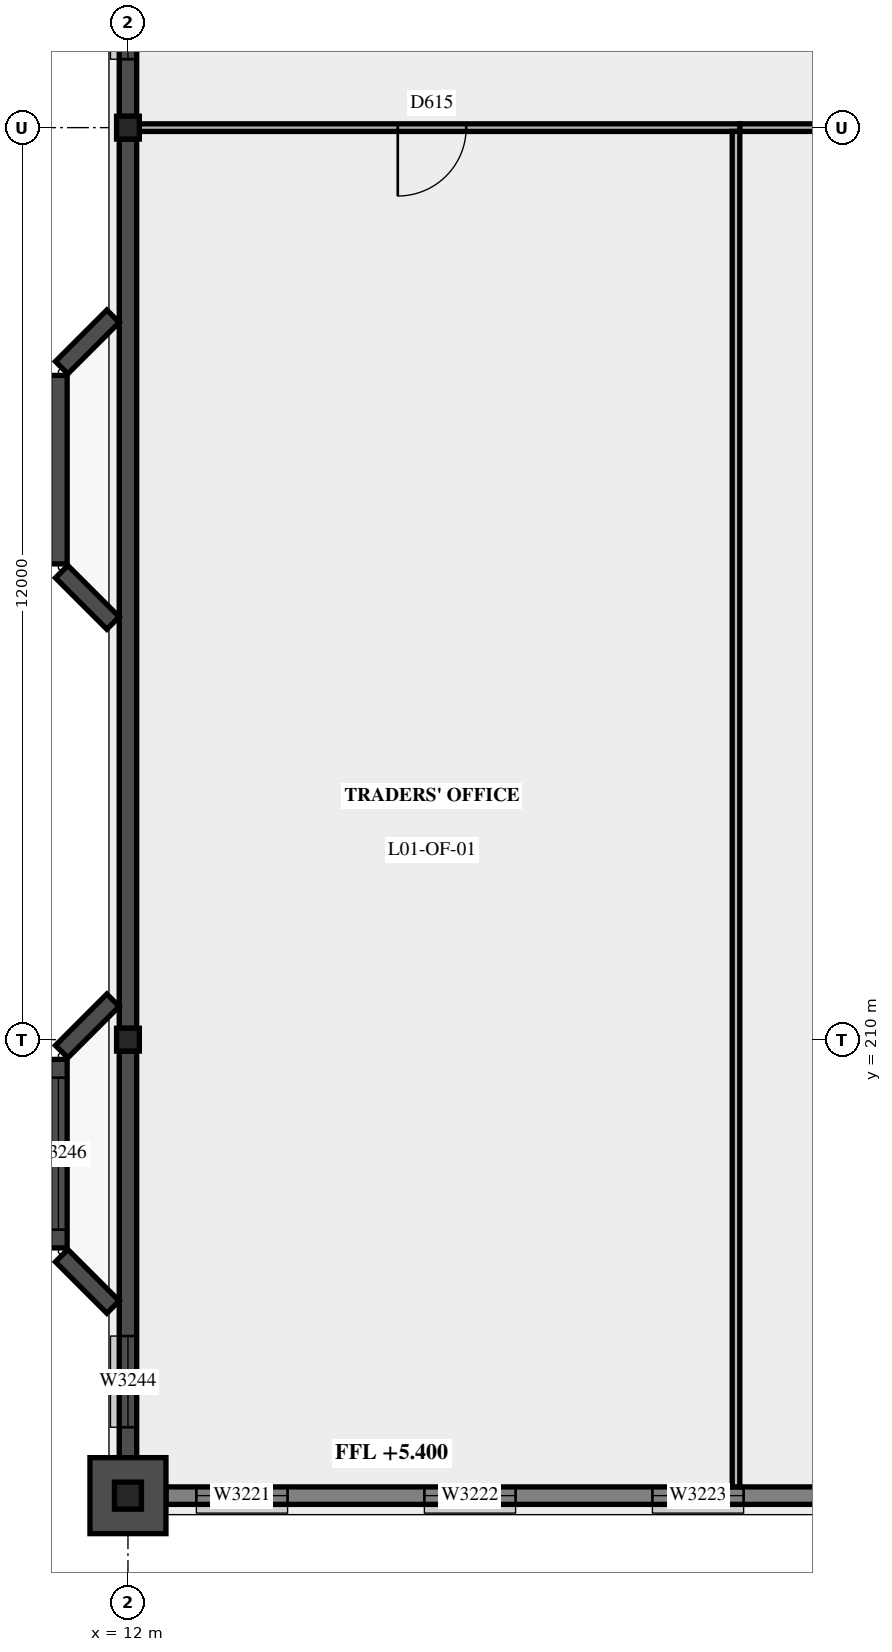
"""IFC4 building model, lengths in metres.
Left out: names, types, materials, properties, quantities, classifications, styles, units other than length and angle.
Written with IfcOpenShell. Run it as: python <this file> out.ifc"""

import sys

from ifc_helpers import new_model, si_unit, direction, frame, frame_2d, origin, origin_2d, place, context, subcontext, project, spatial, rectangle, hollow_circle, i_section, extrude, element, fill, save


model = new_model("IFC4")
c1 = context("Model", 3, precision=1e-05, world=origin(), true_north=direction((0.0, 1.0)))
c2 = subcontext(c1, "Body", "Model", "MODEL_VIEW")
j1 = project(units=[si_unit("LENGTHUNIT", "METRE"), si_unit("PLANEANGLEUNIT", "RADIAN")], contexts=[c1])
p1 = place(None, origin())
s1 = spatial("IfcSite", under=j1, at=p1, CompositionType="ELEMENT")
p2 = place(p1, origin())
s2 = spatial("IfcBuilding", under=s1, at=p2, CompositionType="ELEMENT")
p3 = place(p2, frame((0.0, 0.0, 5.4)))
s3 = spatial("IfcBuildingStorey", under=s2, at=p3, CompositionType="ELEMENT", Elevation=5.4)
for number, where, z_axis, x_axis in (
    (1, (12.0, 210.0, 0.0), (0.0, 0.0, 1.0), (1.0, 0.0, 0.0)),
    (2, (12.0, 222.0, 0.0), (0.0, 0.0, 1.0), (1.0, 0.0, 0.0)),
):
    element("IfcColumn", number, at=place(p3, frame(where, z_axis=z_axis, x_axis=x_axis)), inside=s3, PredefinedType="COLUMN", context=c2, shape_type="SweptSolid", body=[
        extrude(i_section(OverallWidth=0.3, OverallDepth=0.3, WebThickness=0.011, FlangeThickness=0.019, at=origin_2d()), origin(), (0.0, 0.0, 1.0), 5.4),
    ])
p4 = place(p3, frame((12.0, 204.0, 0.0), z_axis=(0.0, 0.0, 1.0), x_axis=(1.0, 0.0, 0.0)))
e3 = element("IfcColumn", 3, at=p4, inside=s3, PredefinedType="COLUMN", context=c2, shape_type="SweptSolid", body=[
    extrude(hollow_circle(Radius=0.178, WallThickness=0.012, at=origin_2d()), origin(), (0.0, 0.0, 1.0), 5.4),
])
p5 = place(p3, frame((12.5, 204.0, 0.0), z_axis=(0.0, 0.0, 1.0), x_axis=(1.0, 0.0, 0.0)))
e4 = element("IfcWall", 4, at=p5, inside=s3, PredefinedType="SOLIDWALL", context=c2, shape_type="SweptSolid", body=[
    extrude(rectangle(XDim=11.35, YDim=0.23, at=frame_2d((5.675, 0.0))), origin(), (0.0, 0.0, 1.0), 4.65),
])
p6 = place(p5, frame((0.4, 0.0, 0.9)))
e5 = element("IfcOpeningElement", 5, at=p6, cuts=e4, PredefinedType="OPENING", context=c2, shape_type="SweptSolid", body=[
    extrude(rectangle(XDim=1.2, YDim=3.3, at=frame_2d((0.6, 1.65))), frame((0.0, 0.125, 0.0), z_axis=(0.0, -1.0, 0.0), x_axis=(1.0, 0.0, 0.0)), (0.0, 0.0, 1.0), 0.25),
])
p7 = place(p5, frame((3.4, 0.0, 0.9)))
e6 = element("IfcOpeningElement", 6, at=p7, cuts=e4, PredefinedType="OPENING", context=c2, shape_type="SweptSolid", body=[
    extrude(rectangle(XDim=1.2, YDim=3.3, at=frame_2d((0.6, 1.65))), frame((0.0, 0.125, 0.0), z_axis=(0.0, -1.0, 0.0), x_axis=(1.0, 0.0, 0.0)), (0.0, 0.0, 1.0), 0.25),
])
p8 = place(p5, frame((6.4, 0.0, 0.9)))
e7 = element("IfcOpeningElement", 7, at=p8, cuts=e4, PredefinedType="OPENING", context=c2, shape_type="SweptSolid", body=[
    extrude(rectangle(XDim=1.2, YDim=3.3, at=frame_2d((0.6, 1.65))), frame((0.0, 0.125, 0.0), z_axis=(0.0, -1.0, 0.0), x_axis=(1.0, 0.0, 0.0)), (0.0, 0.0, 1.0), 0.25),
])
p9 = place(p5, frame((9.4, 0.0, 0.9)))
e8 = element("IfcOpeningElement", 8, at=p9, cuts=e4, PredefinedType="OPENING", context=c2, shape_type="SweptSolid", body=[
    extrude(rectangle(XDim=1.2, YDim=3.3, at=frame_2d((0.6, 1.65))), frame((0.0, 0.125, 0.0), z_axis=(0.0, -1.0, 0.0), x_axis=(1.0, 0.0, 0.0)), (0.0, 0.0, 1.0), 0.25),
])
p10 = place(p3, frame((12.0, 204.5, 0.0), z_axis=(0.0, 0.0, 1.0), x_axis=(0.0, 1.0, 0.0)))
e9 = element("IfcWall", 9, at=p10, inside=s3, PredefinedType="SOLIDWALL", context=c2, shape_type="SweptSolid", body=[
    extrude(rectangle(XDim=5.35, YDim=0.23, at=frame_2d((2.675, 0.0))), origin(), (0.0, 0.0, 1.0), 5.4),
])
p11 = place(p10, frame((0.4, 0.0, 0.9)))
e10 = element("IfcOpeningElement", 10, at=p11, cuts=e9, PredefinedType="OPENING", context=c2, shape_type="SweptSolid", body=[
    extrude(rectangle(XDim=1.2, YDim=3.3, at=frame_2d((0.6, 1.65))), frame((0.0, 0.125, 0.0), z_axis=(0.0, -1.0, 0.0), x_axis=(1.0, 0.0, 0.0)), (0.0, 0.0, 1.0), 0.25),
])
p12 = place(p10, frame((3.0, 0.0, 0.75)))
e11 = element("IfcOpeningElement", 11, at=p12, cuts=e9, PredefinedType="OPENING", context=c2, shape_type="SweptSolid", body=[
    extrude(rectangle(XDim=2.0, YDim=2.55, at=frame_2d((1.0, 1.275))), frame((0.0, 0.125, 0.0), z_axis=(0.0, -1.0, 0.0), x_axis=(1.0, 0.0, 0.0)), (0.0, 0.0, 1.0), 0.25),
])
p13 = place(p3, frame((12.0, 210.15, 0.0), z_axis=(0.0, 0.0, 1.0), x_axis=(0.0, 1.0, 0.0)))
e12 = element("IfcWall", 12, at=p13, inside=s3, PredefinedType="SOLIDWALL", context=c2, shape_type="SweptSolid", body=[
    extrude(rectangle(XDim=11.7, YDim=0.23, at=frame_2d((5.85, 0.0))), origin(), (0.0, 0.0, 1.0), 5.4),
])
p14 = place(p13, frame((6.35, 0.0, 0.75)))
e13 = element("IfcOpeningElement", 13, at=p14, cuts=e12, PredefinedType="OPENING", context=c2, shape_type="SweptSolid", body=[
    extrude(rectangle(XDim=2.0, YDim=2.55, at=frame_2d((1.0, 1.275))), frame((0.0, 0.125, 0.0), z_axis=(0.0, -1.0, 0.0), x_axis=(1.0, 0.0, 0.0)), (0.0, 0.0, 1.0), 0.25),
])
p15 = place(p3, frame((12.0, 222.15, 0.0), z_axis=(0.0, 0.0, 1.0), x_axis=(0.0, 1.0, 0.0)))
e14 = element("IfcWall", 14, at=p15, inside=s3, PredefinedType="SOLIDWALL", context=c2, shape_type="SweptSolid", body=[
    extrude(rectangle(XDim=3.85, YDim=0.23, at=frame_2d((1.925, 0.0))), origin(), (0.0, 0.0, 1.0), 5.4),
])
p16 = place(p15, frame((0.75, 0.0, 0.9)))
e15 = element("IfcOpeningElement", 15, at=p16, cuts=e14, PredefinedType="OPENING", context=c2, shape_type="SweptSolid", body=[
    extrude(rectangle(XDim=1.2, YDim=3.3, at=frame_2d((0.6, 1.65))), frame((0.0, 0.125, 0.0), z_axis=(0.0, -1.0, 0.0), x_axis=(1.0, 0.0, 0.0)), (0.0, 0.0, 1.0), 0.25),
])
p17 = place(p3, frame((11.5, 204.0, 0.0), z_axis=(0.0, 0.0, 1.0), x_axis=(1.0, 0.0, 0.0)))
e16 = element("IfcWall", 16, at=p17, inside=s3, PredefinedType="SOLIDWALL", context=c2, shape_type="SweptSolid", body=[
    extrude(rectangle(XDim=1.0, YDim=1.0, at=frame_2d((0.5, 0.0))), origin(), (0.0, 0.0, 1.0), 5.4),
])
p18 = place(p3, frame((11.804, 206.481, 0.75), z_axis=(0.0, 0.0, 1.0), x_axis=(-0.707106781187, 0.707106781187, 0.0)))
e17 = element("IfcWall", 17, at=p18, inside=s3, PredefinedType="SOLIDWALL", context=c2, shape_type="SweptSolid", body=[
    extrude(rectangle(XDim=0.956, YDim=0.23, at=frame_2d((0.478, 0.0))), origin(), (0.0, 0.0, 1.0), 2.55),
])
p19 = place(p3, frame((11.085, 207.26, 0.75), z_axis=(0.0, 0.0, 1.0), x_axis=(0.0, 1.0, 0.0)))
e18 = element("IfcWall", 18, at=p19, inside=s3, PredefinedType="SOLIDWALL", context=c2, shape_type="SweptSolid", body=[
    extrude(rectangle(XDim=2.48, YDim=0.23, at=frame_2d((1.24, 0.0))), origin(), (0.0, 0.0, 1.0), 2.55),
])
p20 = place(p19, frame((0.24, 0.0, 0.15)))
e19 = element("IfcOpeningElement", 19, at=p20, cuts=e18, PredefinedType="OPENING", context=c2, shape_type="SweptSolid", body=[
    extrude(rectangle(XDim=2.0, YDim=2.1, at=frame_2d((1.0, 1.05))), frame((0.0, 0.125, 0.0), z_axis=(0.0, -1.0, 0.0), x_axis=(1.0, 0.0, 0.0)), (0.0, 0.0, 1.0), 0.25),
])
p21 = place(p3, frame((11.127, 209.843, 0.75), z_axis=(0.0, 0.0, 1.0), x_axis=(0.707106781187, 0.707106781187, 0.0)))
e20 = element("IfcWall", 20, at=p21, inside=s3, PredefinedType="SOLIDWALL", context=c2, shape_type="SweptSolid", body=[
    extrude(rectangle(XDim=0.956, YDim=0.23, at=frame_2d((0.478, 0.0))), origin(), (0.0, 0.0, 1.0), 2.55),
])
for number, where, z_axis, x_axis in (
    (21, (11.805, 206.45, 0.05), (0.0, 0.0, 1.0), (0.0, 1.0, 0.0)),
    (22, (11.805, 210.05, 0.05), (0.0, 0.0, 1.0), (0.0, 1.0, 0.0)),
):
    element("IfcWall", number, at=place(p3, frame(where, z_axis=z_axis, x_axis=x_axis)), inside=s3, PredefinedType="SOLIDWALL", context=c2, shape_type="SweptSolid", body=[
        extrude(rectangle(XDim=0.5, YDim=0.16, at=frame_2d((0.25, 0.0))), origin(), (0.0, 0.0, 1.0), 0.18),
    ])
for number, where, z_axis, x_axis in (
    (23, (11.715, 206.45, 0.23), (0.0, 0.0, 1.0), (0.0, 1.0, 0.0)),
    (24, (11.715, 210.05, 0.23), (0.0, 0.0, 1.0), (0.0, 1.0, 0.0)),
):
    element("IfcWall", number, at=place(p3, frame(where, z_axis=z_axis, x_axis=x_axis)), inside=s3, PredefinedType="SOLIDWALL", context=c2, shape_type="SweptSolid", body=[
        extrude(rectangle(XDim=0.5, YDim=0.34, at=frame_2d((0.25, 0.0))), origin(), (0.0, 0.0, 1.0), 0.18),
    ])
for number, where, z_axis, x_axis in (
    (25, (11.635, 206.45, 0.41), (0.0, 0.0, 1.0), (0.0, 1.0, 0.0)),
    (26, (11.635, 210.05, 0.41), (0.0, 0.0, 1.0), (0.0, 1.0, 0.0)),
):
    element("IfcWall", number, at=place(p3, frame(where, z_axis=z_axis, x_axis=x_axis)), inside=s3, PredefinedType="SOLIDWALL", context=c2, shape_type="SweptSolid", body=[
        extrude(rectangle(XDim=0.5, YDim=0.5, at=frame_2d((0.25, 0.0))), origin(), (0.0, 0.0, 1.0), 0.18),
    ])
p22 = place(p3, frame((11.804, 215.481, 0.75), z_axis=(0.0, 0.0, 1.0), x_axis=(-0.707106781187, 0.707106781187, 0.0)))
e27 = element("IfcWall", 27, at=p22, inside=s3, PredefinedType="SOLIDWALL", context=c2, shape_type="SweptSolid", body=[
    extrude(rectangle(XDim=0.956, YDim=0.23, at=frame_2d((0.478, 0.0))), origin(), (0.0, 0.0, 1.0), 2.55),
])
p23 = place(p3, frame((11.085, 216.26, 0.75), z_axis=(0.0, 0.0, 1.0), x_axis=(0.0, 1.0, 0.0)))
e28 = element("IfcWall", 28, at=p23, inside=s3, PredefinedType="SOLIDWALL", context=c2, shape_type="SweptSolid", body=[
    extrude(rectangle(XDim=2.48, YDim=0.23, at=frame_2d((1.24, 0.0))), origin(), (0.0, 0.0, 1.0), 2.55),
])
p24 = place(p3, frame((11.127, 218.843, 0.75), z_axis=(0.0, 0.0, 1.0), x_axis=(0.707106781187, 0.707106781187, 0.0)))
e29 = element("IfcWall", 29, at=p24, inside=s3, PredefinedType="SOLIDWALL", context=c2, shape_type="SweptSolid", body=[
    extrude(rectangle(XDim=0.956, YDim=0.23, at=frame_2d((0.478, 0.0))), origin(), (0.0, 0.0, 1.0), 2.55),
])
for number, where, z_axis, x_axis in (
    (30, (11.805, 215.45, 0.05), (0.0, 0.0, 1.0), (0.0, 1.0, 0.0)),
    (31, (11.805, 219.05, 0.05), (0.0, 0.0, 1.0), (0.0, 1.0, 0.0)),
):
    element("IfcWall", number, at=place(p3, frame(where, z_axis=z_axis, x_axis=x_axis)), inside=s3, PredefinedType="SOLIDWALL", context=c2, shape_type="SweptSolid", body=[
        extrude(rectangle(XDim=0.5, YDim=0.16, at=frame_2d((0.25, 0.0))), origin(), (0.0, 0.0, 1.0), 0.18),
    ])
for number, where, z_axis, x_axis in (
    (32, (11.715, 215.45, 0.23), (0.0, 0.0, 1.0), (0.0, 1.0, 0.0)),
    (33, (11.715, 219.05, 0.23), (0.0, 0.0, 1.0), (0.0, 1.0, 0.0)),
):
    element("IfcWall", number, at=place(p3, frame(where, z_axis=z_axis, x_axis=x_axis)), inside=s3, PredefinedType="SOLIDWALL", context=c2, shape_type="SweptSolid", body=[
        extrude(rectangle(XDim=0.5, YDim=0.34, at=frame_2d((0.25, 0.0))), origin(), (0.0, 0.0, 1.0), 0.18),
    ])
for number, where, z_axis, x_axis in (
    (34, (11.635, 215.45, 0.41), (0.0, 0.0, 1.0), (0.0, 1.0, 0.0)),
    (35, (11.635, 219.05, 0.41), (0.0, 0.0, 1.0), (0.0, 1.0, 0.0)),
):
    element("IfcWall", number, at=place(p3, frame(where, z_axis=z_axis, x_axis=x_axis)), inside=s3, PredefinedType="SOLIDWALL", context=c2, shape_type="SweptSolid", body=[
        extrude(rectangle(XDim=0.5, YDim=0.5, at=frame_2d((0.25, 0.0))), origin(), (0.0, 0.0, 1.0), 0.18),
    ])
p25 = place(p3, frame((12.15, 222.0, 0.0), z_axis=(0.0, 0.0, 1.0), x_axis=(1.0, 0.0, 0.0)))
e36 = element("IfcWall", 36, at=p25, inside=s3, PredefinedType="PARTITIONING", context=c2, shape_type="SweptSolid", body=[
    extrude(rectangle(XDim=7.9, YDim=0.1, at=frame_2d((3.95, 0.0))), origin(), (0.0, 0.0, 1.0), 4.65),
])
p26 = place(p25, frame((3.4, 0.0, 0.0)))
e37 = element("IfcOpeningElement", 37, at=p26, cuts=e36, PredefinedType="OPENING", context=c2, shape_type="SweptSolid", body=[
    extrude(rectangle(XDim=0.9, YDim=2.1, at=frame_2d((0.45, 1.05))), frame((0.0, 0.06, 0.0), z_axis=(0.0, -1.0, 0.0), x_axis=(1.0, 0.0, 0.0)), (0.0, 0.0, 1.0), 0.12),
])
p27 = place(p3, frame((20.05, 222.0, 0.0), z_axis=(0.0, 0.0, 1.0), x_axis=(1.0, 0.0, 0.0)))
e38 = element("IfcWall", 38, at=p27, inside=s3, PredefinedType="PARTITIONING", context=c2, shape_type="SweptSolid", body=[
    extrude(rectangle(XDim=3.8, YDim=0.1, at=frame_2d((1.9, 0.0))), origin(), (0.0, 0.0, 1.0), 4.65),
])
p28 = place(p27, frame((1.1, 0.0, 0.0)))
e39 = element("IfcOpeningElement", 39, at=p28, cuts=e38, PredefinedType="OPENING", context=c2, shape_type="SweptSolid", body=[
    extrude(rectangle(XDim=0.9, YDim=2.1, at=frame_2d((0.45, 1.05))), frame((0.0, 0.06, 0.0), z_axis=(0.0, -1.0, 0.0), x_axis=(1.0, 0.0, 0.0)), (0.0, 0.0, 1.0), 0.12),
])
p29 = place(p3, frame((20.0, 204.115, 0.0), z_axis=(0.0, 0.0, 1.0), x_axis=(0.0, 1.0, 0.0)))
e40 = element("IfcWall", 40, at=p29, inside=s3, PredefinedType="PARTITIONING", context=c2, shape_type="SweptSolid", body=[
    extrude(rectangle(XDim=17.835, YDim=0.1, at=frame_2d((8.917, 0.0))), origin(), (0.0, 0.0, 1.0), 4.65),
])
p30 = place(p6, origin())
e41 = element("IfcWindow", 41, at=p30, inside=s3, PartitioningType="SINGLE_PANEL", PredefinedType="WINDOW", context=c2, shape_type="SweptSolid", body=[
    extrude(rectangle(XDim=1.2, YDim=3.3, at=frame_2d((0.6, 1.65))), frame((0.0, 0.03, 0.0), z_axis=(0.0, -1.0, 0.0), x_axis=(1.0, 0.0, 0.0)), (0.0, 0.0, 1.0), 0.06),
])
fill(e5, e41)
p31 = place(p7, origin())
e42 = element("IfcWindow", 42, at=p31, inside=s3, PartitioningType="SINGLE_PANEL", PredefinedType="WINDOW", context=c2, shape_type="SweptSolid", body=[
    extrude(rectangle(XDim=1.2, YDim=3.3, at=frame_2d((0.6, 1.65))), frame((0.0, 0.03, 0.0), z_axis=(0.0, -1.0, 0.0), x_axis=(1.0, 0.0, 0.0)), (0.0, 0.0, 1.0), 0.06),
])
fill(e6, e42)
p32 = place(p8, origin())
e43 = element("IfcWindow", 43, at=p32, inside=s3, PartitioningType="SINGLE_PANEL", PredefinedType="WINDOW", context=c2, shape_type="SweptSolid", body=[
    extrude(rectangle(XDim=1.2, YDim=3.3, at=frame_2d((0.6, 1.65))), frame((0.0, 0.03, 0.0), z_axis=(0.0, -1.0, 0.0), x_axis=(1.0, 0.0, 0.0)), (0.0, 0.0, 1.0), 0.06),
])
fill(e7, e43)
p33 = place(p11, origin())
e44 = element("IfcWindow", 44, at=p33, inside=s3, PartitioningType="SINGLE_PANEL", PredefinedType="WINDOW", context=c2, shape_type="SweptSolid", body=[
    extrude(rectangle(XDim=1.2, YDim=3.3, at=frame_2d((0.6, 1.65))), frame((0.0, 0.03, 0.0), z_axis=(0.0, -1.0, 0.0), x_axis=(1.0, 0.0, 0.0)), (0.0, 0.0, 1.0), 0.06),
])
fill(e10, e44)
p34 = place(p16, origin())
e45 = element("IfcWindow", 45, at=p34, inside=s3, PartitioningType="SINGLE_PANEL", PredefinedType="WINDOW", context=c2, shape_type="SweptSolid", body=[
    extrude(rectangle(XDim=1.2, YDim=3.3, at=frame_2d((0.6, 1.65))), frame((0.0, 0.03, 0.0), z_axis=(0.0, -1.0, 0.0), x_axis=(1.0, 0.0, 0.0)), (0.0, 0.0, 1.0), 0.06),
])
fill(e15, e45)
p35 = place(p20, origin())
e46 = element("IfcWindow", 46, at=p35, inside=s3, PartitioningType="SINGLE_PANEL", PredefinedType="WINDOW", context=c2, shape_type="SweptSolid", body=[
    extrude(rectangle(XDim=2.0, YDim=2.1, at=frame_2d((1.0, 1.05))), frame((0.0, 0.03, 0.0), z_axis=(0.0, -1.0, 0.0), x_axis=(1.0, 0.0, 0.0)), (0.0, 0.0, 1.0), 0.06),
])
fill(e19, e46)
p36 = place(p26, origin())
e47 = element("IfcDoor", 47, at=p36, inside=s3, OperationType="SINGLE_SWING_RIGHT", PredefinedType="DOOR", context=c2, shape_type="SweptSolid", body=[
    extrude(rectangle(XDim=0.9, YDim=2.1, at=frame_2d((0.45, 1.05))), frame((0.0, 0.025, 0.0), z_axis=(0.0, -1.0, 0.0), x_axis=(1.0, 0.0, 0.0)), (0.0, 0.0, 1.0), 0.05),
])
fill(e37, e47)
save(model, sys.argv[1])
